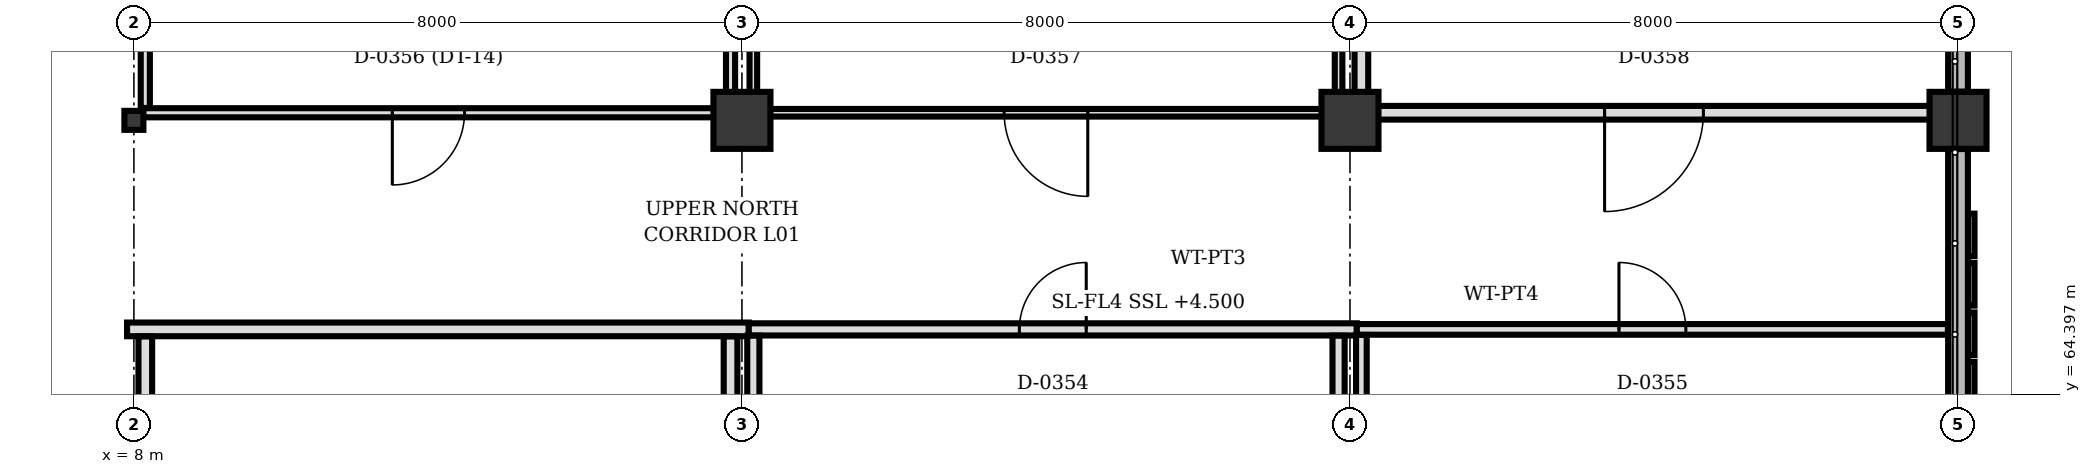
"""IFC4 building model, lengths in metres.
Left out: names, types, materials, properties, quantities, classifications, styles, units other than length and angle.
Written with IfcOpenShell. Run it as: python <this file> out.ifc"""

import sys

from ifc_helpers import new_model, si_unit, direction, frame, frame_2d, origin, origin_2d, place, context, subcontext, project, spatial, rectangle, hollow_rectangle, extrude, element, fill, save


model = new_model("IFC4")
c1 = context("Model", 3, precision=1e-05, world=origin(), true_north=direction((0.0, 1.0)))
c2 = subcontext(c1, "Body", "Model", "MODEL_VIEW")
j1 = project(units=[si_unit("LENGTHUNIT", "METRE"), si_unit("PLANEANGLEUNIT", "RADIAN")], contexts=[c1])
p1 = place(None, origin())
s1 = spatial("IfcSite", under=j1, at=p1, CompositionType="ELEMENT")
p2 = place(p1, origin())
s2 = spatial("IfcBuilding", under=s1, at=p2, CompositionType="ELEMENT")
p3 = place(p2, frame((0.0, 0.0, 4.5)))
s3 = spatial("IfcBuildingStorey", under=s2, at=p3, CompositionType="ELEMENT", Elevation=4.5)
for number, where, z_axis, x_axis in (
    (1, (16.0, 68.0, 0.0), (0.0, 0.0, 1.0), (1.0, 0.0, 0.0)),
    (2, (24.0, 68.0, 0.0), (0.0, 0.0, 1.0), (1.0, 0.0, 0.0)),
    (3, (32.0, 68.0, 0.0), (0.0, 0.0, 1.0), (1.0, 0.0, 0.0)),
):
    element("IfcColumn", number, at=place(p3, frame(where, z_axis=z_axis, x_axis=x_axis)), inside=s3, PredefinedType="COLUMN", context=c2, shape_type="SweptSolid", body=[
        extrude(rectangle(XDim=0.75, YDim=0.75, at=origin_2d()), origin(), (0.0, 0.0, 1.0), 4.0),
    ])
p4 = place(p3, frame((8.0, 68.0, 0.0), z_axis=(0.0, 0.0, 1.0), x_axis=(1.0, 0.0, 0.0)))
e4 = element("IfcColumn", 4, at=p4, inside=s3, PredefinedType="COLUMN", context=c2, shape_type="SweptSolid", body=[
    extrude(hollow_rectangle(XDim=0.25, YDim=0.25, WallThickness=0.01, at=origin_2d()), origin(), (0.0, 0.0, 1.0), 4.0),
])
p5 = place(p3, frame((32.0, 75.623, 0.0), z_axis=(0.0, 0.0, 1.0), x_axis=(0.0, -1.0, 0.0)))
e5 = element("IfcWall", 5, at=p5, inside=s3, PredefinedType="SOLIDWALL", context=c2, shape_type="SweptSolid", body=[
    extrude(rectangle(XDim=7.246, YDim=0.26, at=frame_2d((3.623, 0.0))), origin(), (0.0, 0.0, 1.0), 3.132),
])
p6 = place(p5, frame((4.817, 0.0, 0.9)))
e6 = element("IfcOpeningElement", 6, at=p6, cuts=e5, PredefinedType="OPENING", context=c2, shape_type="SweptSolid", body=[
    extrude(rectangle(XDim=0.8, YDim=1.1, at=frame_2d((0.4, 0.55))), frame((0.0, 0.14, 0.0), z_axis=(0.0, -1.0, 0.0), x_axis=(1.0, 0.0, 0.0)), (0.0, 0.0, 1.0), 0.28),
])
p7 = place(p3, frame((32.0, 67.623, 0.0), z_axis=(0.0, 0.0, 1.0), x_axis=(0.0, -1.0, 0.0)))
e7 = element("IfcWall", 7, at=p7, inside=s3, PredefinedType="SOLIDWALL", context=c2, shape_type="SweptSolid", body=[
    extrude(rectangle(XDim=5.511, YDim=0.26, at=frame_2d((2.755, 0.0))), origin(), (0.0, 0.0, 1.0), 2.982),
])
p8 = place(p3, frame((7.91, 65.25, 0.0), z_axis=(0.0, 0.0, 1.0), x_axis=(1.0, 0.0, 0.0)))
e8 = element("IfcWall", 8, at=p8, inside=s3, PredefinedType="PARTITIONING", context=c2, shape_type="SweptSolid", body=[
    extrude(rectangle(XDim=8.18, YDim=0.18, at=frame_2d((4.09, 0.0))), origin(), (0.0, 0.0, 1.0), 3.132),
])
p9 = place(p3, frame((15.85, 65.157, 0.0), z_axis=(0.0, 0.0, 1.0), x_axis=(0.0, -1.0, 0.0)))
e9 = element("IfcWall", 9, at=p9, inside=s3, PredefinedType="PARTITIONING", context=c2, shape_type="SweptSolid", body=[
    extrude(rectangle(XDim=2.79, YDim=0.18, at=frame_2d((1.395, 0.0))), origin(), (0.0, 0.0, 1.0), 3.132),
])
p10 = place(p3, frame((8.15, 58.26, 0.0), z_axis=(0.0, 0.0, 1.0), x_axis=(0.0, 1.0, 0.0)))
e10 = element("IfcWall", 10, at=p10, inside=s3, PredefinedType="PARTITIONING", context=c2, shape_type="SweptSolid", body=[
    extrude(rectangle(XDim=6.897, YDim=0.18, at=frame_2d((3.448, 0.0))), origin(), (0.0, 0.0, 1.0), 2.982),
])
p11 = place(p10, frame((2.457, 0.0, 0.0)))
e11 = element("IfcOpeningElement", 11, at=p11, cuts=e10, PredefinedType="OPENING", context=c2, shape_type="SweptSolid", body=[
    extrude(rectangle(XDim=0.88, YDim=2.1, at=frame_2d((0.44, 1.05))), frame((0.0, 0.1, 0.0), z_axis=(0.0, -1.0, 0.0), x_axis=(1.0, 0.0, 0.0)), (0.0, 0.0, 1.0), 0.2),
])
p12 = place(p3, frame((16.09, 65.25, 0.0), z_axis=(0.0, 0.0, 1.0), x_axis=(1.0, 0.0, 0.0)))
e12 = element("IfcWall", 12, at=p12, inside=s3, PredefinedType="PARTITIONING", context=c2, shape_type="SweptSolid", body=[
    extrude(rectangle(XDim=8.0, YDim=0.16, at=frame_2d((4.0, 0.0))), origin(), (0.0, 0.0, 1.0), 3.132),
])
p13 = place(p12, frame((3.56, 0.0, 0.0)))
e13 = element("IfcOpeningElement", 13, at=p13, cuts=e12, PredefinedType="OPENING", context=c2, shape_type="SweptSolid", body=[
    extrude(rectangle(XDim=0.88, YDim=2.1, at=frame_2d((0.44, 1.05))), frame((0.0, 0.09, 0.0), z_axis=(0.0, -1.0, 0.0), x_axis=(1.0, 0.0, 0.0)), (0.0, 0.0, 1.0), 0.18),
])
for number, where, z_axis, x_axis in (
    (14, (23.85, 65.167, 0.0), (0.0, 0.0, 1.0), (0.0, -1.0, 0.0)),
    (15, (16.15, 62.367, 0.0), (0.0, 0.0, 1.0), (0.0, 1.0, 0.0)),
):
    element("IfcWall", number, at=place(p3, frame(where, z_axis=z_axis, x_axis=x_axis)), inside=s3, PredefinedType="PARTITIONING", context=c2, shape_type="SweptSolid", body=[
        extrude(rectangle(XDim=2.8, YDim=0.16, at=frame_2d((1.4, 0.0))), origin(), (0.0, 0.0, 1.0), 3.132),
    ])
p14 = place(p3, frame((24.09, 65.25, 0.0), z_axis=(0.0, 0.0, 1.0), x_axis=(1.0, 0.0, 0.0)))
e16 = element("IfcWall", 16, at=p14, inside=s3, PredefinedType="PARTITIONING", context=c2, shape_type="SweptSolid", body=[
    extrude(rectangle(XDim=7.777, YDim=0.14, at=frame_2d((3.888, 0.0))), origin(), (0.0, 0.0, 1.0), 3.132),
])
p15 = place(p14, frame((3.449, 0.0, 0.0)))
e17 = element("IfcOpeningElement", 17, at=p15, cuts=e16, PredefinedType="OPENING", context=c2, shape_type="SweptSolid", body=[
    extrude(rectangle(XDim=0.88, YDim=2.1, at=frame_2d((0.44, 1.05))), frame((0.0, 0.08, 0.0), z_axis=(0.0, -1.0, 0.0), x_axis=(1.0, 0.0, 0.0)), (0.0, 0.0, 1.0), 0.16),
])
p16 = place(p3, frame((24.15, 62.367, 0.0), z_axis=(0.0, 0.0, 1.0), x_axis=(0.0, 1.0, 0.0)))
e18 = element("IfcWall", 18, at=p16, inside=s3, PredefinedType="PARTITIONING", context=c2, shape_type="SweptSolid", body=[
    extrude(rectangle(XDim=2.81, YDim=0.14, at=frame_2d((1.405, 0.0))), origin(), (0.0, 0.0, 1.0), 3.132),
])
p17 = place(p3, frame((15.85, 75.633, 0.0), z_axis=(0.0, 0.0, 1.0), x_axis=(0.0, -1.0, 0.0)))
e19 = element("IfcWall", 19, at=p17, inside=s3, PredefinedType="PARTITIONING", context=c2, shape_type="SweptSolid", body=[
    extrude(rectangle(XDim=7.266, YDim=0.12, at=frame_2d((3.633, 0.0))), origin(), (0.0, 0.0, 1.0), 3.132),
])
p18 = place(p3, frame((15.633, 68.1, 0.0), z_axis=(0.0, 0.0, 1.0), x_axis=(-1.0, 0.0, 0.0)))
e20 = element("IfcWall", 20, at=p18, inside=s3, PredefinedType="PARTITIONING", context=c2, shape_type="SweptSolid", body=[
    extrude(rectangle(XDim=7.516, YDim=0.12, at=frame_2d((3.758, 0.0))), origin(), (0.0, 0.0, 1.0), 2.982),
])
p19 = place(p18, frame((3.283, 0.0, 0.0)))
e21 = element("IfcOpeningElement", 21, at=p19, cuts=e20, PredefinedType="OPENING", context=c2, shape_type="SweptSolid", body=[
    extrude(rectangle(XDim=0.95, YDim=2.28, at=frame_2d((0.475, 1.14))), frame((0.0, 0.07, 0.0), z_axis=(0.0, -1.0, 0.0), x_axis=(1.0, 0.0, 0.0)), (0.0, 0.0, 1.0), 0.14),
])
p20 = place(p3, frame((8.15, 68.163, 0.0), z_axis=(0.0, 0.0, 1.0), x_axis=(0.0, 1.0, 0.0)))
e22 = element("IfcWall", 22, at=p20, inside=s3, PredefinedType="PARTITIONING", context=c2, shape_type="SweptSolid", body=[
    extrude(rectangle(XDim=7.47, YDim=0.12, at=frame_2d((3.735, 0.0))), origin(), (0.0, 0.0, 1.0), 2.982),
])
p21 = place(p3, frame((23.85, 75.633, 0.0), z_axis=(0.0, 0.0, 1.0), x_axis=(0.0, -1.0, 0.0)))
e23 = element("IfcWall", 23, at=p21, inside=s3, PredefinedType="PARTITIONING", context=c2, shape_type="SweptSolid", body=[
    extrude(rectangle(XDim=7.266, YDim=0.1, at=frame_2d((3.633, 0.0))), origin(), (0.0, 0.0, 1.0), 3.132),
])
p22 = place(p3, frame((23.633, 68.1, 0.0), z_axis=(0.0, 0.0, 1.0), x_axis=(-1.0, 0.0, 0.0)))
e24 = element("IfcWall", 24, at=p22, inside=s3, PredefinedType="PARTITIONING", context=c2, shape_type="SweptSolid", body=[
    extrude(rectangle(XDim=7.266, YDim=0.1, at=frame_2d((3.633, 0.0))), origin(), (0.0, 0.0, 1.0), 2.982),
])
p23 = place(p22, frame((3.083, 0.0, 0.0)))
e25 = element("IfcOpeningElement", 25, at=p23, cuts=e24, PredefinedType="OPENING", context=c2, shape_type="SweptSolid", body=[
    extrude(rectangle(XDim=1.1, YDim=2.28, at=frame_2d((0.55, 1.14))), frame((0.0, 0.06, 0.0), z_axis=(0.0, -1.0, 0.0), x_axis=(1.0, 0.0, 0.0)), (0.0, 0.0, 1.0), 0.12),
])
p24 = place(p3, frame((16.15, 68.367, 0.0), z_axis=(0.0, 0.0, 1.0), x_axis=(0.0, 1.0, 0.0)))
e26 = element("IfcWall", 26, at=p24, inside=s3, PredefinedType="PARTITIONING", context=c2, shape_type="SweptSolid", body=[
    extrude(rectangle(XDim=7.266, YDim=0.1, at=frame_2d((3.633, 0.0))), origin(), (0.0, 0.0, 1.0), 3.132),
])
p25 = place(p3, frame((31.633, 68.1, 0.0), z_axis=(0.0, 0.0, 1.0), x_axis=(-1.0, 0.0, 0.0)))
e27 = element("IfcWall", 27, at=p25, inside=s3, PredefinedType="PARTITIONING", context=c2, shape_type="SweptSolid", body=[
    extrude(rectangle(XDim=7.266, YDim=0.18, at=frame_2d((3.633, 0.0))), origin(), (0.0, 0.0, 1.0), 2.982),
])
p26 = place(p25, frame((2.983, 0.0, 0.0)))
e28 = element("IfcOpeningElement", 28, at=p26, cuts=e27, PredefinedType="OPENING", context=c2, shape_type="SweptSolid", body=[
    extrude(rectangle(XDim=1.3, YDim=2.28, at=frame_2d((0.65, 1.14))), frame((0.0, 0.1, 0.0), z_axis=(0.0, -1.0, 0.0), x_axis=(1.0, 0.0, 0.0)), (0.0, 0.0, 1.0), 0.2),
])
p27 = place(p3, frame((24.15, 68.367, 0.0), z_axis=(0.0, 0.0, 1.0), x_axis=(0.0, 1.0, 0.0)))
e29 = element("IfcWall", 29, at=p27, inside=s3, PredefinedType="PARTITIONING", context=c2, shape_type="SweptSolid", body=[
    extrude(rectangle(XDim=7.266, YDim=0.18, at=frame_2d((3.633, 0.0))), origin(), (0.0, 0.0, 1.0), 3.132),
])
p28 = place(p13, origin())
e30 = element("IfcDoor", 30, at=p28, inside=s3, OperationType="SINGLE_SWING_RIGHT", PredefinedType="DOOR", context=c2, shape_type="SweptSolid", body=[
    extrude(rectangle(XDim=0.88, YDim=2.1, at=frame_2d((0.44, 1.05))), frame((0.0, 0.025, 0.0), z_axis=(0.0, -1.0, 0.0), x_axis=(1.0, 0.0, 0.0)), (0.0, 0.0, 1.0), 0.05),
])
fill(e13, e30)
p29 = place(p15, origin())
e31 = element("IfcDoor", 31, at=p29, inside=s3, OperationType="SINGLE_SWING_LEFT", PredefinedType="DOOR", context=c2, shape_type="SweptSolid", body=[
    extrude(rectangle(XDim=0.88, YDim=2.1, at=frame_2d((0.44, 1.05))), frame((0.0, 0.025, 0.0), z_axis=(0.0, -1.0, 0.0), x_axis=(1.0, 0.0, 0.0)), (0.0, 0.0, 1.0), 0.05),
])
fill(e17, e31)
p30 = place(p19, origin())
e32 = element("IfcDoor", 32, at=p30, inside=s3, OperationType="SINGLE_SWING_RIGHT", PredefinedType="DOOR", context=c2, shape_type="SweptSolid", body=[
    extrude(rectangle(XDim=0.95, YDim=2.28, at=frame_2d((0.475, 1.14))), frame((0.0, 0.025, 0.0), z_axis=(0.0, -1.0, 0.0), x_axis=(1.0, 0.0, 0.0)), (0.0, 0.0, 1.0), 0.05),
])
fill(e21, e32)
p31 = place(p23, origin())
e33 = element("IfcDoor", 33, at=p31, inside=s3, OperationType="SINGLE_SWING_LEFT", PredefinedType="DOOR", context=c2, shape_type="SweptSolid", body=[
    extrude(rectangle(XDim=1.1, YDim=2.28, at=frame_2d((0.55, 1.14))), frame((0.0, 0.025, 0.0), z_axis=(0.0, -1.0, 0.0), x_axis=(1.0, 0.0, 0.0)), (0.0, 0.0, 1.0), 0.05),
])
fill(e25, e33)
p32 = place(p26, origin())
e34 = element("IfcDoor", 34, at=p32, inside=s3, OperationType="SINGLE_SWING_RIGHT", PredefinedType="DOOR", context=c2, shape_type="SweptSolid", body=[
    extrude(rectangle(XDim=1.3, YDim=2.28, at=frame_2d((0.65, 1.14))), frame((0.0, 0.025, 0.0), z_axis=(0.0, -1.0, 0.0), x_axis=(1.0, 0.0, 0.0)), (0.0, 0.0, 1.0), 0.05),
])
fill(e28, e34)
save(model, sys.argv[1])
